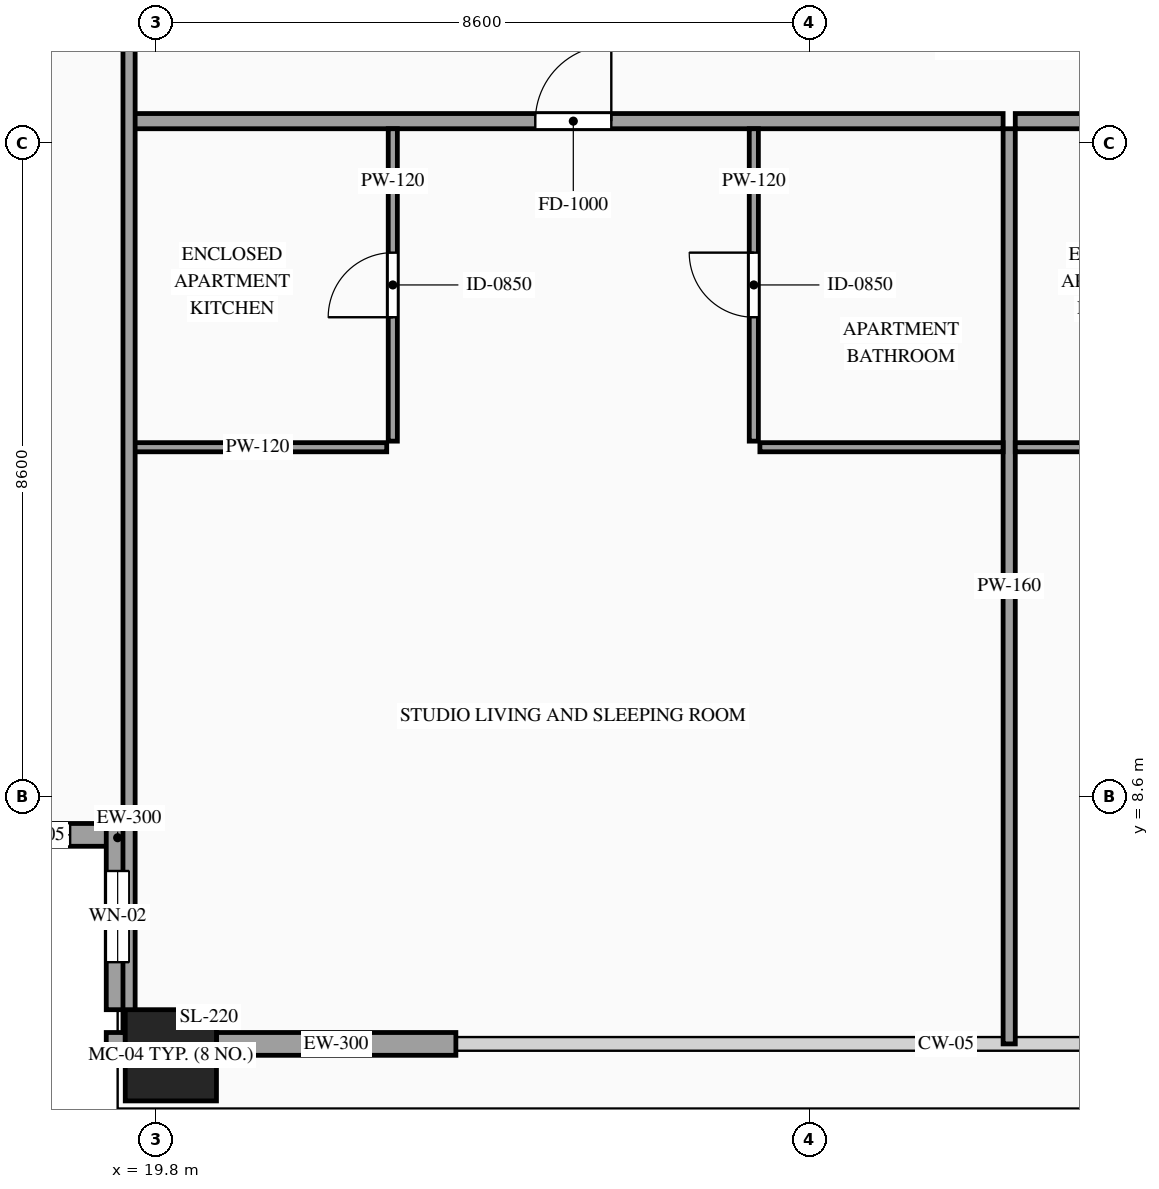
"""IFC4 building model, lengths in metres.
Left out: names, types, materials, properties, quantities, classifications, styles, units other than length and angle.
Written with IfcOpenShell. Run it as: python <this file> out.ifc"""

import sys

from ifc_helpers import new_model, si_unit, direction, frame, frame_2d, origin, origin_2d, place, context, subcontext, project, spatial, rectangle, hollow_rectangle, extrude, source, transform, mapped, element, fill, save


model = new_model("IFC4")
c1 = context("Model", 3, precision=1e-05, world=origin(), true_north=direction((0.0, 1.0)))
c2 = subcontext(c1, "Body", "Model", "MODEL_VIEW")
j1 = project(units=[si_unit("LENGTHUNIT", "METRE"), si_unit("PLANEANGLEUNIT", "RADIAN")], contexts=[c1])
p1 = place(None, origin())
s1 = spatial("IfcSite", under=j1, at=p1, CompositionType="ELEMENT")
p2 = place(p1, origin())
s2 = spatial("IfcBuilding", under=s1, at=p2, CompositionType="ELEMENT")
p3 = place(p2, frame((0.0, 0.0, 238.1)))
s3 = spatial("IfcBuildingStorey", under=s2, at=p3, CompositionType="ELEMENT", Elevation=238.1)
m1 = source(origin(), c2, "Body", "SweptSolid", [
    extrude(hollow_rectangle(XDim=1.2, YDim=1.2, WallThickness=0.055, at=origin_2d()), origin(), (0.0, 0.0, 1.0), 3.5),
])
p4 = place(p3, frame((20.0, 5.2, 0.0), z_axis=(0.0, 0.0, 1.0), x_axis=(1.0, 0.0, 0.0)))
e1 = element("IfcColumn", 1, at=p4, inside=s3, PredefinedType="COLUMN", context=c2, shape_type="MappedRepresentation", body=[
    mapped(m1, transform((0.0, 0.0, 0.0), scale=1.0)),
])
p5 = place(p3, frame((17.0, 8.1, 0.0), z_axis=(0.0, 0.0, 1.0), x_axis=(1.0, 0.0, 0.0)))
e2 = element("IfcWall", 2, at=p5, inside=s3, PredefinedType="SOLIDWALL", context=c2, shape_type="SweptSolid", body=[
    extrude(rectangle(XDim=2.45, YDim=0.3, at=frame_2d((1.225, 0.0))), origin(), (0.0, 0.0, 1.0), 3.28),
])
p6 = place(p5, frame((0.775, 0.0, 0.85)))
e3 = element("IfcOpeningElement", 3, at=p6, cuts=e2, PredefinedType="OPENING", context=c2, shape_type="SweptSolid", body=[
    extrude(rectangle(XDim=0.9, YDim=1.5, at=frame_2d((0.45, 0.75))), frame((0.0, 0.165, 0.0), z_axis=(0.0, -1.0, 0.0), x_axis=(1.0, 0.0, 0.0)), (0.0, 0.0, 1.0), 0.33),
])
p7 = place(p3, frame((19.3, 8.25, 0.0), z_axis=(0.0, 0.0, 1.0), x_axis=(0.0, -1.0, 0.0)))
e4 = element("IfcWall", 4, at=p7, inside=s3, PredefinedType="SOLIDWALL", context=c2, shape_type="SweptSolid", body=[
    extrude(rectangle(XDim=2.45, YDim=0.3, at=frame_2d((1.225, 0.0))), origin(), (0.0, 0.0, 1.0), 3.28),
])
p8 = place(p7, frame((0.625, 0.0, 0.85)))
e5 = element("IfcOpeningElement", 5, at=p8, cuts=e4, PredefinedType="OPENING", context=c2, shape_type="SweptSolid", body=[
    extrude(rectangle(XDim=1.2, YDim=2.1, at=frame_2d((0.6, 1.05))), frame((0.0, 0.165, 0.0), z_axis=(0.0, -1.0, 0.0), x_axis=(1.0, 0.0, 0.0)), (0.0, 0.0, 1.0), 0.33),
])
m2 = source(origin(), c2, "Body", "SweptSolid", [
    extrude(rectangle(XDim=0.25, YDim=0.3, at=frame_2d((0.125, 0.0))), origin(), (0.0, 0.0, 1.0), 3.28),
])
p9 = place(p3, frame((19.15, 5.35, 0.0), z_axis=(0.0, 0.0, 1.0), x_axis=(1.0, 0.0, 0.0)))
e6 = element("IfcWall", 6, at=p9, inside=s3, PredefinedType="SOLIDWALL", context=c2, shape_type="MappedRepresentation", body=[
    mapped(m2, transform((0.0, 0.0, 0.0), scale=1.0)),
])
m3 = source(origin(), c2, "Body", "SweptSolid", [
    extrude(rectangle(XDim=3.15, YDim=0.3, at=frame_2d((1.575, 0.0))), origin(), (0.0, 0.0, 1.0), 2.835),
])
p10 = place(p3, frame((20.6, 5.35, 0.0), z_axis=(0.0, 0.0, 1.0), x_axis=(1.0, 0.0, 0.0)))
e7 = element("IfcWall", 7, at=p10, inside=s3, PredefinedType="SOLIDWALL", context=c2, shape_type="MappedRepresentation", body=[
    mapped(m3, transform((0.0, 0.0, 0.0), scale=1.0)),
])
p11 = place(p3, frame((19.44, 17.49, 0.0), z_axis=(0.0, 0.0, 1.0), x_axis=(1.0, 0.0, 0.0)))
e8 = element("IfcWall", 8, at=p11, inside=s3, PredefinedType="PARTITIONING", context=c2, shape_type="SweptSolid", body=[
    extrude(rectangle(XDim=11.51, YDim=0.2, at=frame_2d((5.755, 0.0))), origin(), (0.0, 0.0, 1.0), 3.28),
])
p12 = place(p11, frame((5.355, 0.0, 0.0)))
e9 = element("IfcOpeningElement", 9, at=p12, cuts=e8, PredefinedType="OPENING", context=c2, shape_type="SweptSolid", body=[
    extrude(rectangle(XDim=1.0, YDim=2.2, at=frame_2d((0.5, 1.1))), frame((0.0, 0.115, 0.0), z_axis=(0.0, -1.0, 0.0), x_axis=(1.0, 0.0, 0.0)), (0.0, 0.0, 1.0), 0.23),
])
m4 = source(origin(), c2, "Body", "SweptSolid", [
    extrude(rectangle(XDim=12.04, YDim=0.16, at=frame_2d((6.02, 0.0))), origin(), (0.0, 0.0, 1.0), 3.28),
])
p13 = place(p3, frame((31.03, 5.35, 0.0), z_axis=(0.0, 0.0, 1.0), x_axis=(0.0, 1.0, 0.0)))
e10 = element("IfcWall", 10, at=p13, inside=s3, PredefinedType="PARTITIONING", context=c2, shape_type="MappedRepresentation", body=[
    mapped(m4, transform((0.0, 0.0, 0.0), scale=1.0)),
])
m5 = source(origin(), c2, "Body", "SweptSolid", [
    extrude(rectangle(XDim=3.4, YDim=0.12, at=frame_2d((1.7, 0.0))), origin(), (0.0, 0.0, 1.0), 3.28),
])
p14 = place(p3, frame((19.44, 13.2, 0.0), z_axis=(0.0, 0.0, 1.0), x_axis=(1.0, 0.0, 0.0)))
e11 = element("IfcWall", 11, at=p14, inside=s3, PredefinedType="PARTITIONING", context=c2, shape_type="MappedRepresentation", body=[
    mapped(m5, transform((0.0, 0.0, 0.0), scale=1.0)),
])
p15 = place(p3, frame((22.92, 13.28, 0.0), z_axis=(0.0, 0.0, 1.0), x_axis=(0.0, 1.0, 0.0)))
e12 = element("IfcWall", 12, at=p15, inside=s3, PredefinedType="PARTITIONING", context=c2, shape_type="SweptSolid", body=[
    extrude(rectangle(XDim=4.11, YDim=0.12, at=frame_2d((2.055, 0.0))), origin(), (0.0, 0.0, 1.0), 3.28),
])
p16 = place(p15, frame((1.63, 0.0, 0.0)))
e13 = element("IfcOpeningElement", 13, at=p16, cuts=e12, PredefinedType="OPENING", context=c2, shape_type="SweptSolid", body=[
    extrude(rectangle(XDim=0.85, YDim=2.1, at=frame_2d((0.425, 1.05))), frame((0.0, 0.075, 0.0), z_axis=(0.0, -1.0, 0.0), x_axis=(1.0, 0.0, 0.0)), (0.0, 0.0, 1.0), 0.15),
])
m6 = source(origin(), c2, "Body", "SweptSolid", [
    extrude(rectangle(XDim=3.2, YDim=0.12, at=frame_2d((1.6, 0.0))), origin(), (0.0, 0.0, 1.0), 3.28),
])
p17 = place(p3, frame((27.75, 13.2, 0.0), z_axis=(0.0, 0.0, 1.0), x_axis=(1.0, 0.0, 0.0)))
e14 = element("IfcWall", 14, at=p17, inside=s3, PredefinedType="PARTITIONING", context=c2, shape_type="MappedRepresentation", body=[
    mapped(m6, transform((0.0, 0.0, 0.0), scale=1.0)),
])
p18 = place(p3, frame((27.67, 13.28, 0.0), z_axis=(0.0, 0.0, 1.0), x_axis=(0.0, 1.0, 0.0)))
e15 = element("IfcWall", 15, at=p18, inside=s3, PredefinedType="PARTITIONING", context=c2, shape_type="SweptSolid", body=[
    extrude(rectangle(XDim=4.11, YDim=0.12, at=frame_2d((2.055, 0.0))), origin(), (0.0, 0.0, 1.0), 3.28),
])
p19 = place(p18, frame((1.63, 0.0, 0.0)))
e16 = element("IfcOpeningElement", 16, at=p19, cuts=e15, PredefinedType="OPENING", context=c2, shape_type="SweptSolid", body=[
    extrude(rectangle(XDim=0.85, YDim=2.1, at=frame_2d((0.425, 1.05))), frame((0.0, 0.075, 0.0), z_axis=(0.0, -1.0, 0.0), x_axis=(1.0, 0.0, 0.0)), (0.0, 0.0, 1.0), 0.15),
])
p20 = place(p3, frame((31.11, 17.49, 0.0), z_axis=(0.0, 0.0, 1.0), x_axis=(1.0, 0.0, 0.0)))
e17 = element("IfcWall", 17, at=p20, inside=s3, PredefinedType="PARTITIONING", context=c2, shape_type="SweptSolid", body=[
    extrude(rectangle(XDim=11.429, YDim=0.2, at=frame_2d((5.714, 0.0))), origin(), (0.0, 0.0, 1.0), 3.28),
])
p21 = place(p20, frame((5.314, 0.0, 0.0)))
e18 = element("IfcOpeningElement", 18, at=p21, cuts=e17, PredefinedType="OPENING", context=c2, shape_type="SweptSolid", body=[
    extrude(rectangle(XDim=1.0, YDim=2.2, at=frame_2d((0.5, 1.1))), frame((0.0, 0.115, 0.0), z_axis=(0.0, -1.0, 0.0), x_axis=(1.0, 0.0, 0.0)), (0.0, 0.0, 1.0), 0.23),
])
m7 = source(origin(), c2, "Body", "SweptSolid", [
    extrude(rectangle(XDim=3.4, YDim=0.12, at=frame_2d((1.7, 0.0))), origin(), (0.0, 0.0, 1.0), 3.28),
])
p22 = place(p3, frame((31.11, 13.2, 0.0), z_axis=(0.0, 0.0, 1.0), x_axis=(1.0, 0.0, 0.0)))
e19 = element("IfcWall", 19, at=p22, inside=s3, PredefinedType="PARTITIONING", context=c2, shape_type="MappedRepresentation", body=[
    mapped(m7, transform((0.0, 0.0, 0.0), scale=1.0)),
])
m8 = source(origin(), c2, "Body", "SweptSolid", [
    extrude(rectangle(XDim=26.69, YDim=0.16, at=frame_2d((13.345, 0.0))), origin(), (0.0, 0.0, 1.0), 3.28),
])
p23 = place(p3, frame((19.45, 5.5, 0.0), z_axis=(0.0, 0.0, 1.0), x_axis=(0.0, 1.0, 0.0)))
e20 = element("IfcWall", 20, at=p23, inside=s3, PredefinedType="PARTITIONING", context=c2, shape_type="MappedRepresentation", body=[
    mapped(m8, transform((0.0, 0.0, 0.0), scale=1.0)),
])
m9 = source(origin(), c2, "Body", "SweptSolid", [
    extrude(rectangle(XDim=0.9, YDim=1.5, at=frame_2d((0.45, 0.75))), frame((0.0, 0.03, 0.0), z_axis=(0.0, -1.0, 0.0), x_axis=(1.0, 0.0, 0.0)), (0.0, 0.0, 1.0), 0.06),
])
p24 = place(p6, origin())
e21 = element("IfcWindow", 21, at=p24, inside=s3, PartitioningType="SINGLE_PANEL", PredefinedType="WINDOW", context=c2, shape_type="MappedRepresentation", body=[
    mapped(m9, transform((0.0, 0.0, 0.0), scale=1.0)),
])
fill(e3, e21)
m10 = source(origin(), c2, "Body", "SweptSolid", [
    extrude(rectangle(XDim=1.2, YDim=2.1, at=frame_2d((0.6, 1.05))), frame((0.0, 0.03, 0.0), z_axis=(0.0, -1.0, 0.0), x_axis=(1.0, 0.0, 0.0)), (0.0, 0.0, 1.0), 0.06),
])
p25 = place(p8, origin())
e22 = element("IfcWindow", 22, at=p25, inside=s3, PartitioningType="SINGLE_PANEL", PredefinedType="WINDOW", context=c2, shape_type="MappedRepresentation", body=[
    mapped(m10, transform((0.0, 0.0, 0.0), scale=1.0)),
])
fill(e5, e22)
m11 = source(origin(), c2, "Body", "SweptSolid", [
    extrude(rectangle(XDim=1.0, YDim=2.2, at=frame_2d((0.5, 1.1))), frame((0.0, 0.025, 0.0), z_axis=(0.0, -1.0, 0.0), x_axis=(1.0, 0.0, 0.0)), (0.0, 0.0, 1.0), 0.05),
])
p26 = place(p12, origin())
e23 = element("IfcDoor", 23, at=p26, inside=s3, OperationType="SINGLE_SWING_RIGHT", PredefinedType="DOOR", context=c2, shape_type="MappedRepresentation", body=[
    mapped(m11, transform((0.0, 0.0, 0.0), scale=1.0)),
])
fill(e9, e23)
m12 = source(origin(), c2, "Body", "SweptSolid", [
    extrude(rectangle(XDim=0.85, YDim=2.1, at=frame_2d((0.425, 1.05))), frame((0.0, 0.025, 0.0), z_axis=(0.0, -1.0, 0.0), x_axis=(1.0, 0.0, 0.0)), (0.0, 0.0, 1.0), 0.05),
])
p27 = place(p16, origin())
e24 = element("IfcDoor", 24, at=p27, inside=s3, OperationType="SINGLE_SWING_LEFT", PredefinedType="DOOR", context=c2, shape_type="MappedRepresentation", body=[
    mapped(m12, transform((0.0, 0.0, 0.0), scale=1.0)),
])
fill(e13, e24)
p28 = place(p19, origin())
e25 = element("IfcDoor", 25, at=p28, inside=s3, OperationType="SINGLE_SWING_RIGHT", PredefinedType="DOOR", context=c2, shape_type="MappedRepresentation", body=[
    mapped(m12, transform((0.0, 0.0, 0.0), scale=1.0)),
])
fill(e16, e25)
save(model, sys.argv[1])
